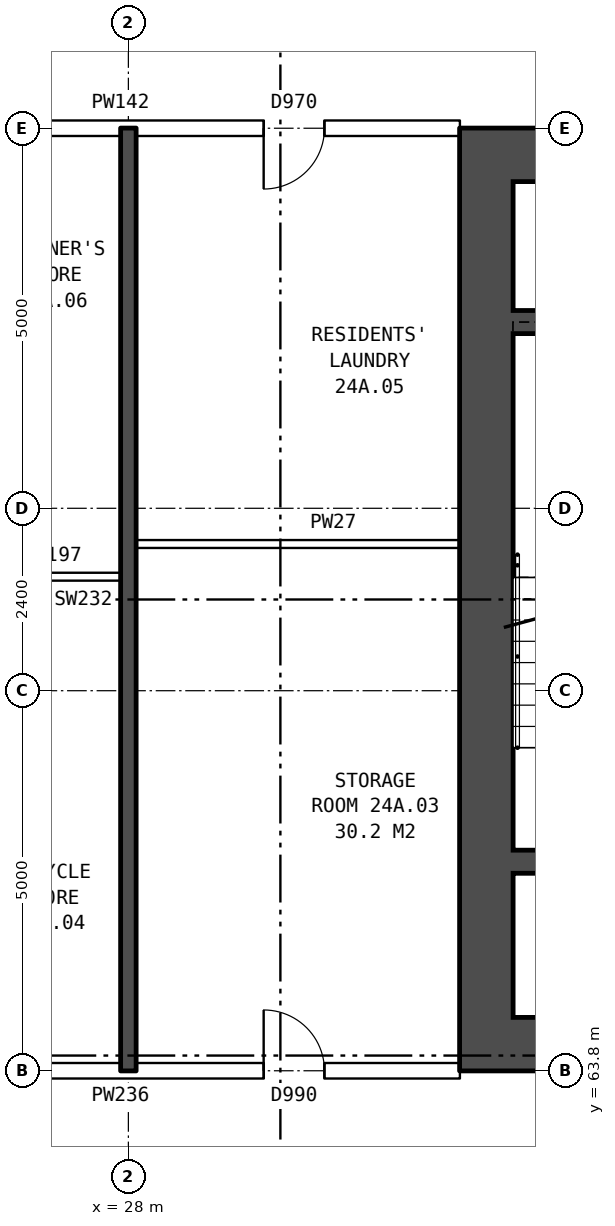
"""IFC4 building model, lengths in metres.
Left out: names, types, materials, properties, quantities, classifications, styles, units other than length and angle.
Written with IfcOpenShell. Run it as: python <this file> out.ifc"""

import sys

from ifc_helpers import new_model, si_unit, direction, frame, frame_2d, origin, place, context, subcontext, project, spatial, rectangle, extrude, element, fill, save


model = new_model("IFC4")
c1 = context("Model", 3, precision=1e-05, world=origin(), true_north=direction((0.0, 1.0)))
c2 = subcontext(c1, "Body", "Model", "MODEL_VIEW")
j1 = project(units=[si_unit("LENGTHUNIT", "METRE"), si_unit("PLANEANGLEUNIT", "RADIAN")], contexts=[c1])
p1 = place(None, origin())
s1 = spatial("IfcSite", under=j1, at=p1, CompositionType="ELEMENT")
p2 = place(p1, origin())
s2 = spatial("IfcBuilding", under=s1, at=p2, CompositionType="ELEMENT")
p3 = place(p2, frame((0.0, 0.0, 87.1)))
s3 = spatial("IfcBuildingStorey", under=s2, at=p3, CompositionType="ELEMENT", Elevation=87.1)
p4 = place(p3, frame((32.71, 75.5, 0.0), z_axis=(0.0, 0.0, 1.0), x_axis=(0.0, -1.0, 0.0)))
e1 = element("IfcWall", 1, at=p4, inside=s3, PredefinedType="SHEAR", context=c2, shape_type="SweptSolid", body=[
    extrude(rectangle(XDim=11.0, YDim=0.7, at=frame_2d((5.5, 0.0))), origin(), (0.0, 0.0, 1.0), 2.85),
])
for number, where, z_axis, x_axis in (
    (2, (41.36, 75.85, 0.0), (0.0, 0.0, 1.0), (-1.0, 0.0, 0.0)),
    (3, (41.36, 64.15, 0.0), (0.0, 0.0, 1.0), (-1.0, 0.0, 0.0)),
):
    element("IfcWall", number, at=place(p3, frame(where, z_axis=z_axis, x_axis=x_axis)), inside=s3, PredefinedType="SHEAR", context=c2, shape_type="SweptSolid", body=[
        extrude(rectangle(XDim=9.0, YDim=0.7, at=frame_2d((4.5, 0.0))), origin(), (0.0, 0.0, 1.0), 2.85),
    ])
p5 = place(p3, frame((36.11, 73.65, 0.0), z_axis=(0.0, 0.0, 1.0), x_axis=(-1.0, 0.0, 0.0)))
e4 = element("IfcWall", 4, at=p5, inside=s3, PredefinedType="SHEAR", context=c2, shape_type="SweptSolid", body=[
    extrude(rectangle(XDim=3.05, YDim=0.3, at=frame_2d((1.525, 0.0))), origin(), (0.0, 0.0, 1.0), 2.85),
])
p6 = place(p3, frame((36.11, 66.55, 0.0), z_axis=(0.0, 0.0, 1.0), x_axis=(-1.0, 0.0, 0.0)))
e5 = element("IfcWall", 5, at=p6, inside=s3, PredefinedType="SHEAR", context=c2, shape_type="SweptSolid", body=[
    extrude(rectangle(XDim=3.05, YDim=0.3, at=frame_2d((1.525, 0.0))), origin(), (0.0, 0.0, 1.0), 2.85),
])
p7 = place(p6, frame((0.17, 0.0, 0.0)))
e6 = element("IfcOpeningElement", 6, at=p7, cuts=e5, PredefinedType="OPENING", context=c2, shape_type="SweptSolid", body=[
    extrude(rectangle(XDim=1.1, YDim=2.1, at=frame_2d((0.55, 1.05))), frame((0.0, 0.16, 0.0), z_axis=(0.0, -1.0, 0.0), x_axis=(1.0, 0.0, 0.0)), (0.0, 0.0, 1.0), 0.32),
])
p8 = place(p3, frame((26.01, 63.8, 0.0), z_axis=(0.0, 0.0, 1.0), x_axis=(1.0, 0.0, 0.0)))
e7 = element("IfcWall", 7, at=p8, inside=s3, PredefinedType="PARTITIONING", context=c2, shape_type="SweptSolid", body=[
    extrude(rectangle(XDim=6.35, YDim=0.2, at=frame_2d((3.175, 0.0))), origin(), (0.0, 0.0, 1.0), 2.85),
])
p9 = place(p8, frame((3.77, 0.0, 0.0)))
e8 = element("IfcOpeningElement", 8, at=p9, cuts=e7, PredefinedType="OPENING", context=c2, shape_type="SweptSolid", body=[
    extrude(rectangle(XDim=0.8, YDim=2.1, at=frame_2d((0.4, 1.05))), frame((0.0, 0.11, 0.0), z_axis=(0.0, -1.0, 0.0), x_axis=(1.0, 0.0, 0.0)), (0.0, 0.0, 1.0), 0.22),
])
p10 = place(p3, frame((26.11, 70.3, 0.0), z_axis=(0.0, 0.0, 1.0), x_axis=(1.0, 0.0, 0.0)))
e9 = element("IfcWall", 9, at=p10, inside=s3, PredefinedType="PARTITIONING", context=c2, shape_type="SweptSolid", body=[
    extrude(rectangle(XDim=1.79, YDim=0.1, at=frame_2d((0.895, 0.0))), origin(), (0.0, 0.0, 1.0), 2.85),
])
p11 = place(p3, frame((28.1, 70.73, 0.0), z_axis=(0.0, 0.0, 1.0), x_axis=(1.0, 0.0, 0.0)))
e10 = element("IfcWall", 10, at=p11, inside=s3, PredefinedType="PARTITIONING", context=c2, shape_type="SweptSolid", body=[
    extrude(rectangle(XDim=4.26, YDim=0.1, at=frame_2d((2.13, 0.0))), origin(), (0.0, 0.0, 1.0), 2.85),
])
p12 = place(p3, frame((26.01, 76.2, 0.0), z_axis=(0.0, 0.0, 1.0), x_axis=(1.0, 0.0, 0.0)))
e11 = element("IfcWall", 11, at=p12, inside=s3, PredefinedType="PARTITIONING", context=c2, shape_type="SweptSolid", body=[
    extrude(rectangle(XDim=6.35, YDim=0.2, at=frame_2d((3.175, 0.0))), origin(), (0.0, 0.0, 1.0), 2.85),
])
p13 = place(p12, frame((3.77, 0.0, 0.0)))
e12 = element("IfcOpeningElement", 12, at=p13, cuts=e11, PredefinedType="OPENING", context=c2, shape_type="SweptSolid", body=[
    extrude(rectangle(XDim=0.8, YDim=2.1, at=frame_2d((0.4, 1.05))), frame((0.0, 0.11, 0.0), z_axis=(0.0, -1.0, 0.0), x_axis=(1.0, 0.0, 0.0)), (0.0, 0.0, 1.0), 0.22),
])
p14 = place(p3, frame((28.0, 63.8, 0.0), z_axis=(0.0, 0.0, 1.0), x_axis=(0.0, 1.0, 0.0)))
e13 = element("IfcWall", 13, at=p14, inside=s3, PredefinedType="SOLIDWALL", context=c2, shape_type="SweptSolid", body=[
    extrude(rectangle(XDim=12.4, YDim=0.2, at=frame_2d((6.2, 0.0))), origin(), (0.0, 0.0, 1.0), 2.85),
])
p15 = place(p9, origin())
e14 = element("IfcDoor", 14, at=p15, inside=s3, OperationType="SINGLE_SWING_LEFT", PredefinedType="DOOR", context=c2, shape_type="SweptSolid", body=[
    extrude(rectangle(XDim=0.8, YDim=2.1, at=frame_2d((0.4, 1.05))), frame((0.0, 0.025, 0.0), z_axis=(0.0, -1.0, 0.0), x_axis=(1.0, 0.0, 0.0)), (0.0, 0.0, 1.0), 0.05),
])
fill(e8, e14)
p16 = place(p13, frame((0.8, 0.0, 0.0), z_axis=(0.0, 0.0, 1.0), x_axis=(-1.0, 0.0, 0.0)))
e15 = element("IfcDoor", 15, at=p16, inside=s3, OperationType="SINGLE_SWING_RIGHT", PredefinedType="DOOR", context=c2, shape_type="SweptSolid", body=[
    extrude(rectangle(XDim=0.8, YDim=2.1, at=frame_2d((0.4, 1.05))), frame((0.0, 0.025, 0.0), z_axis=(0.0, -1.0, 0.0), x_axis=(1.0, 0.0, 0.0)), (0.0, 0.0, 1.0), 0.05),
])
fill(e12, e15)
save(model, sys.argv[1])
